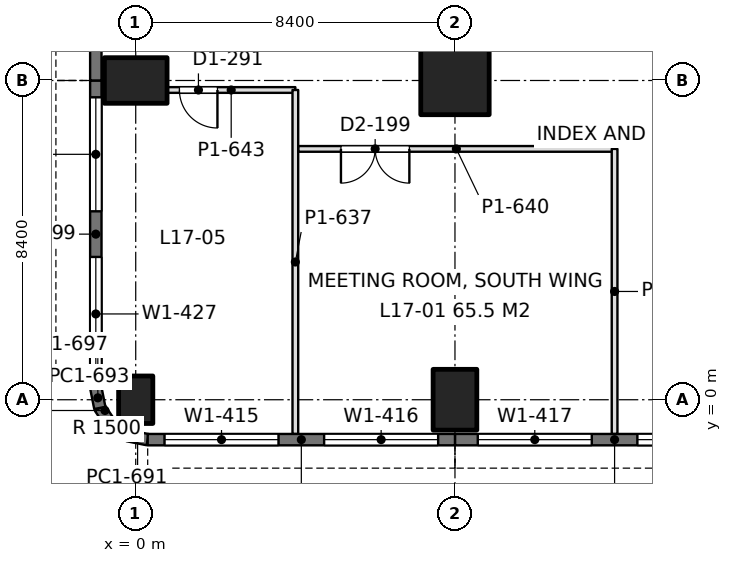
"""IFC4 building model, lengths in metres.
Left out: names, types, materials, properties, quantities, classifications, styles, units other than length and angle.
Written with IfcOpenShell. Run it as: python <this file> out.ifc"""

import sys

from ifc_helpers import new_model, si_unit, direction, frame, frame_2d, origin, origin_with_axes, origin_2d, place, context, subcontext, project, spatial, rectangle, extrude, element, fill, save


model = new_model("IFC4")
c1 = context("Model", 3, precision=1e-05, world=origin(), true_north=direction((0.0, 1.0)))
c2 = subcontext(c1, "Body", "Model", "MODEL_VIEW")
j1 = project(units=[si_unit("LENGTHUNIT", "METRE"), si_unit("PLANEANGLEUNIT", "RADIAN")], contexts=[c1])
p1 = place(None, origin())
s1 = spatial("IfcSite", under=j1, at=p1, CompositionType="ELEMENT")
p2 = place(p1, origin())
s2 = spatial("IfcBuilding", under=s1, at=p2, CompositionType="ELEMENT")
p3 = place(p2, frame((0.0, 0.0, 77.4)))
s3 = spatial("IfcBuildingStorey", under=s2, at=p3, CompositionType="ELEMENT", Elevation=77.4)
p4 = place(p3, origin_with_axes())
e1 = element("IfcColumn", 1, at=p4, inside=s3, PredefinedType="COLUMN", context=c2, shape_type="SweptSolid", body=[
    extrude(rectangle(XDim=0.9, YDim=1.25, at=origin_2d()), origin(), (0.0, 0.0, 1.0), 4.5),
])
p5 = place(p3, frame((0.0, 8.4, 0.0), z_axis=(0.0, 0.0, 1.0), x_axis=(0.0, 1.0, 0.0)))
e2 = element("IfcColumn", 2, at=p5, inside=s3, PredefinedType="COLUMN", context=c2, shape_type="SweptSolid", body=[
    extrude(rectangle(XDim=1.2, YDim=1.65, at=origin_2d()), origin(), (0.0, 0.0, 1.0), 4.5),
])
p6 = place(p3, frame((8.4, 0.0, 0.0), z_axis=(0.0, 0.0, 1.0), x_axis=(1.0, 0.0, 0.0)))
e3 = element("IfcColumn", 3, at=p6, inside=s3, PredefinedType="COLUMN", context=c2, shape_type="SweptSolid", body=[
    extrude(rectangle(XDim=1.15, YDim=1.6, at=origin_2d()), origin(), (0.0, 0.0, 1.0), 4.5),
])
p7 = place(p3, frame((8.4, 8.4, 0.0), z_axis=(0.0, 0.0, 1.0), x_axis=(1.0, 0.0, 0.0)))
e4 = element("IfcColumn", 4, at=p7, inside=s3, PredefinedType="COLUMN", context=c2, shape_type="SweptSolid", body=[
    extrude(rectangle(XDim=1.8, YDim=1.8, at=origin_2d()), origin(), (0.0, 0.0, 1.0), 4.5),
])
p8 = place(p3, frame((16.8, -1.05, 0.0), z_axis=(0.0, 0.0, 1.0), x_axis=(-1.0, 0.0, 0.0)))
e5 = element("IfcWall", 5, at=p8, inside=s3, PredefinedType="SOLIDWALL", context=c2, shape_type="SweptSolid", body=[
    extrude(rectangle(XDim=8.4, YDim=0.3, at=frame_2d((4.2, 0.0))), origin(), (0.0, 0.0, 1.0), 4.34),
])
p9 = place(p8, frame((0.6, 0.0, 0.9)))
e6 = element("IfcOpeningElement", 6, at=p9, cuts=e5, PredefinedType="OPENING", context=c2, shape_type="SweptSolid", body=[
    extrude(rectangle(XDim=3.0, YDim=1.9, at=frame_2d((1.5, 0.95))), frame((0.0, 0.16, 0.0), z_axis=(0.0, -1.0, 0.0), x_axis=(1.0, 0.0, 0.0)), (0.0, 0.0, 1.0), 0.32),
])
p10 = place(p8, frame((4.8, 0.0, 0.9)))
e7 = element("IfcOpeningElement", 7, at=p10, cuts=e5, PredefinedType="OPENING", context=c2, shape_type="SweptSolid", body=[
    extrude(rectangle(XDim=3.0, YDim=1.9, at=frame_2d((1.5, 0.95))), frame((0.0, 0.16, 0.0), z_axis=(0.0, -1.0, 0.0), x_axis=(1.0, 0.0, 0.0)), (0.0, 0.0, 1.0), 0.32),
])
p11 = place(p3, frame((8.4, -1.05, 0.0), z_axis=(0.0, 0.0, 1.0), x_axis=(-1.0, 0.0, 0.0)))
e8 = element("IfcWall", 8, at=p11, inside=s3, PredefinedType="SOLIDWALL", context=c2, shape_type="SweptSolid", body=[
    extrude(rectangle(XDim=8.085, YDim=0.3, at=frame_2d((4.042, 0.0))), origin(), (0.0, 0.0, 1.0), 4.34),
])
p12 = place(p11, frame((0.443, 0.0, 0.9)))
e9 = element("IfcOpeningElement", 9, at=p12, cuts=e8, PredefinedType="OPENING", context=c2, shape_type="SweptSolid", body=[
    extrude(rectangle(XDim=3.0, YDim=1.9, at=frame_2d((1.5, 0.95))), frame((0.0, 0.16, 0.0), z_axis=(0.0, -1.0, 0.0), x_axis=(1.0, 0.0, 0.0)), (0.0, 0.0, 1.0), 0.32),
])
p13 = place(p11, frame((4.643, 0.0, 0.9)))
e10 = element("IfcOpeningElement", 10, at=p13, cuts=e8, PredefinedType="OPENING", context=c2, shape_type="SweptSolid", body=[
    extrude(rectangle(XDim=3.0, YDim=1.9, at=frame_2d((1.5, 0.95))), frame((0.0, 0.16, 0.0), z_axis=(0.0, -1.0, 0.0), x_axis=(1.0, 0.0, 0.0)), (0.0, 0.0, 1.0), 0.32),
])
p14 = place(p3, frame((0.315, -1.05, 0.0), z_axis=(0.0, 0.0, 1.0), x_axis=(-0.980788534345, 0.195073962632, 0.0)))
e11 = element("IfcWall", 11, at=p14, inside=s3, PredefinedType="SOLIDWALL", context=c2, shape_type="SweptSolid", body=[
    extrude(rectangle(XDim=0.541, YDim=0.3, at=frame_2d((0.271, 0.0))), origin(), (0.0, 0.0, 1.0), 4.34),
])
for number, where, z_axis, x_axis in (
    (12, (-0.216, -0.945, 0.0), (0.0, 0.0, 1.0), (-0.831, 0.556, 0.0)),
    (13, (-0.653, -0.653, 0.0), (0.0, 0.0, 1.0), (-0.556, 0.831, 0.0)),
):
    element("IfcWall", number, at=place(p3, frame(where, z_axis=z_axis, x_axis=x_axis)), inside=s3, PredefinedType="SOLIDWALL", context=c2, shape_type="SweptSolid", body=[
        extrude(rectangle(XDim=0.526, YDim=0.3, at=frame_2d((0.263, 0.0))), origin(), (0.0, 0.0, 1.0), 4.34),
    ])
p15 = place(p3, frame((-0.945, -0.216, 0.0), z_axis=(0.0, 0.0, 1.0), x_axis=(-0.195073962632, 0.980788534345, 0.0)))
e14 = element("IfcWall", 14, at=p15, inside=s3, PredefinedType="SOLIDWALL", context=c2, shape_type="SweptSolid", body=[
    extrude(rectangle(XDim=0.541, YDim=0.3, at=frame_2d((0.271, 0.0))), origin(), (0.0, 0.0, 1.0), 4.34),
])
p16 = place(p3, frame((-1.05, 0.315, 0.0), z_axis=(0.0, 0.0, 1.0), x_axis=(0.0, 1.0, 0.0)))
e15 = element("IfcWall", 15, at=p16, inside=s3, PredefinedType="SOLIDWALL", context=c2, shape_type="SweptSolid", body=[
    extrude(rectangle(XDim=8.085, YDim=0.3, at=frame_2d((4.042, 0.0))), origin(), (0.0, 0.0, 1.0), 4.34),
])
p17 = place(p16, frame((0.443, 0.0, 0.9)))
e16 = element("IfcOpeningElement", 16, at=p17, cuts=e15, PredefinedType="OPENING", context=c2, shape_type="SweptSolid", body=[
    extrude(rectangle(XDim=3.0, YDim=1.9, at=frame_2d((1.5, 0.95))), frame((0.0, 0.16, 0.0), z_axis=(0.0, -1.0, 0.0), x_axis=(1.0, 0.0, 0.0)), (0.0, 0.0, 1.0), 0.32),
])
p18 = place(p16, frame((4.643, 0.0, 0.9)))
e17 = element("IfcOpeningElement", 17, at=p18, cuts=e15, PredefinedType="OPENING", context=c2, shape_type="SweptSolid", body=[
    extrude(rectangle(XDim=3.0, YDim=1.9, at=frame_2d((1.5, 0.95))), frame((0.0, 0.16, 0.0), z_axis=(0.0, -1.0, 0.0), x_axis=(1.0, 0.0, 0.0)), (0.0, 0.0, 1.0), 0.32),
])
p19 = place(p3, frame((-1.05, 8.4, 0.0), z_axis=(0.0, 0.0, 1.0), x_axis=(0.0, 1.0, 0.0)))
e18 = element("IfcWall", 18, at=p19, inside=s3, PredefinedType="SOLIDWALL", context=c2, shape_type="SweptSolid", body=[
    extrude(rectangle(XDim=4.2, YDim=0.3, at=frame_2d((2.1, 0.0))), origin(), (0.0, 0.0, 1.0), 4.34),
])
p20 = place(p19, frame((0.9, 0.0, 0.9)))
e19 = element("IfcOpeningElement", 19, at=p20, cuts=e18, PredefinedType="OPENING", context=c2, shape_type="SweptSolid", body=[
    extrude(rectangle(XDim=2.4, YDim=1.9, at=frame_2d((1.2, 0.95))), frame((0.0, 0.16, 0.0), z_axis=(0.0, -1.0, 0.0), x_axis=(1.0, 0.0, 0.0)), (0.0, 0.0, 1.0), 0.32),
])
p21 = place(p3, frame((0.824, 8.15, 0.0), z_axis=(0.0, 0.0, 1.0), x_axis=(1.0, 0.0, 0.0)))
e20 = element("IfcWall", 20, at=p21, inside=s3, PredefinedType="PARTITIONING", context=c2, shape_type="SweptSolid", body=[
    extrude(rectangle(XDim=3.376, YDim=0.15, at=frame_2d((1.688, 0.0))), origin(), (0.0, 0.0, 1.0), 3.84),
])
p22 = place(p21, frame((0.326, 0.0, 0.0)))
e21 = element("IfcOpeningElement", 21, at=p22, cuts=e20, PredefinedType="OPENING", context=c2, shape_type="SweptSolid", body=[
    extrude(rectangle(XDim=1.0, YDim=2.2, at=frame_2d((0.5, 1.1))), frame((0.0, 0.085, 0.0), z_axis=(0.0, -1.0, 0.0), x_axis=(1.0, 0.0, 0.0)), (0.0, 0.0, 1.0), 0.17),
])
p23 = place(p3, frame((4.274, 6.6, 0.0), z_axis=(0.0, 0.0, 1.0), x_axis=(1.0, 0.0, 0.0)))
e22 = element("IfcWall", 22, at=p23, inside=s3, PredefinedType="PARTITIONING", context=c2, shape_type="SweptSolid", body=[
    extrude(rectangle(XDim=8.326, YDim=0.15, at=frame_2d((4.163, 0.0))), origin(), (0.0, 0.0, 1.0), 3.74),
])
p24 = place(p23, frame((1.126, 0.0, 0.0)))
e23 = element("IfcOpeningElement", 23, at=p24, cuts=e22, PredefinedType="OPENING", context=c2, shape_type="SweptSolid", body=[
    extrude(rectangle(XDim=1.8, YDim=2.2, at=frame_2d((0.9, 1.1))), frame((0.0, 0.085, 0.0), z_axis=(0.0, -1.0, 0.0), x_axis=(1.0, 0.0, 0.0)), (0.0, 0.0, 1.0), 0.17),
])
p25 = place(p3, frame((4.2, -0.902, 0.0), z_axis=(0.0, 0.0, 1.0), x_axis=(0.0, 1.0, 0.0)))
e24 = element("IfcWall", 24, at=p25, inside=s3, PredefinedType="PARTITIONING", context=c2, shape_type="SweptSolid", body=[
    extrude(rectangle(XDim=9.052, YDim=0.15, at=frame_2d((4.526, 0.0))), origin(), (0.0, 0.0, 1.0), 3.84),
])
p26 = place(p3, frame((12.6, -0.902, 0.0), z_axis=(0.0, 0.0, 1.0), x_axis=(0.0, 1.0, 0.0)))
e25 = element("IfcWall", 25, at=p26, inside=s3, PredefinedType="PARTITIONING", context=c2, shape_type="SweptSolid", body=[
    extrude(rectangle(XDim=7.502, YDim=0.15, at=frame_2d((3.751, 0.0))), origin(), (0.0, 0.0, 1.0), 3.84),
])
p27 = place(p9, origin())
e26 = element("IfcWindow", 26, at=p27, inside=s3, PartitioningType="SINGLE_PANEL", PredefinedType="WINDOW", context=c2, shape_type="SweptSolid", body=[
    extrude(rectangle(XDim=3.0, YDim=1.9, at=frame_2d((1.5, 0.95))), frame((0.0, 0.03, 0.0), z_axis=(0.0, -1.0, 0.0), x_axis=(1.0, 0.0, 0.0)), (0.0, 0.0, 1.0), 0.06),
])
fill(e6, e26)
p28 = place(p10, origin())
e27 = element("IfcWindow", 27, at=p28, inside=s3, PartitioningType="SINGLE_PANEL", PredefinedType="WINDOW", context=c2, shape_type="SweptSolid", body=[
    extrude(rectangle(XDim=3.0, YDim=1.9, at=frame_2d((1.5, 0.95))), frame((0.0, 0.03, 0.0), z_axis=(0.0, -1.0, 0.0), x_axis=(1.0, 0.0, 0.0)), (0.0, 0.0, 1.0), 0.06),
])
fill(e7, e27)
p29 = place(p12, origin())
e28 = element("IfcWindow", 28, at=p29, inside=s3, PartitioningType="SINGLE_PANEL", PredefinedType="WINDOW", context=c2, shape_type="SweptSolid", body=[
    extrude(rectangle(XDim=3.0, YDim=1.9, at=frame_2d((1.5, 0.95))), frame((0.0, 0.03, 0.0), z_axis=(0.0, -1.0, 0.0), x_axis=(1.0, 0.0, 0.0)), (0.0, 0.0, 1.0), 0.06),
])
fill(e9, e28)
p30 = place(p13, origin())
e29 = element("IfcWindow", 29, at=p30, inside=s3, PartitioningType="SINGLE_PANEL", PredefinedType="WINDOW", context=c2, shape_type="SweptSolid", body=[
    extrude(rectangle(XDim=3.0, YDim=1.9, at=frame_2d((1.5, 0.95))), frame((0.0, 0.03, 0.0), z_axis=(0.0, -1.0, 0.0), x_axis=(1.0, 0.0, 0.0)), (0.0, 0.0, 1.0), 0.06),
])
fill(e10, e29)
p31 = place(p17, origin())
e30 = element("IfcWindow", 30, at=p31, inside=s3, PartitioningType="SINGLE_PANEL", PredefinedType="WINDOW", context=c2, shape_type="SweptSolid", body=[
    extrude(rectangle(XDim=3.0, YDim=1.9, at=frame_2d((1.5, 0.95))), frame((0.0, 0.03, 0.0), z_axis=(0.0, -1.0, 0.0), x_axis=(1.0, 0.0, 0.0)), (0.0, 0.0, 1.0), 0.06),
])
fill(e16, e30)
p32 = place(p18, origin())
e31 = element("IfcWindow", 31, at=p32, inside=s3, PartitioningType="SINGLE_PANEL", PredefinedType="WINDOW", context=c2, shape_type="SweptSolid", body=[
    extrude(rectangle(XDim=3.0, YDim=1.9, at=frame_2d((1.5, 0.95))), frame((0.0, 0.03, 0.0), z_axis=(0.0, -1.0, 0.0), x_axis=(1.0, 0.0, 0.0)), (0.0, 0.0, 1.0), 0.06),
])
fill(e17, e31)
p33 = place(p22, frame((1.0, 0.0, 0.0), z_axis=(0.0, 0.0, 1.0), x_axis=(-1.0, 0.0, 0.0)))
e32 = element("IfcDoor", 32, at=p33, inside=s3, OperationType="SINGLE_SWING_LEFT", PredefinedType="DOOR", context=c2, shape_type="SweptSolid", body=[
    extrude(rectangle(XDim=1.0, YDim=2.2, at=frame_2d((0.5, 1.1))), frame((0.0, 0.025, 0.0), z_axis=(0.0, -1.0, 0.0), x_axis=(1.0, 0.0, 0.0)), (0.0, 0.0, 1.0), 0.05),
])
fill(e21, e32)
p34 = place(p24, frame((1.8, 0.0, 0.0), z_axis=(0.0, 0.0, 1.0), x_axis=(-1.0, 0.0, 0.0)))
e33 = element("IfcDoor", 33, at=p34, inside=s3, OperationType="DOUBLE_DOOR_SINGLE_SWING", PredefinedType="DOOR", context=c2, shape_type="SweptSolid", body=[
    extrude(rectangle(XDim=1.8, YDim=2.2, at=frame_2d((0.9, 1.1))), frame((0.0, 0.025, 0.0), z_axis=(0.0, -1.0, 0.0), x_axis=(1.0, 0.0, 0.0)), (0.0, 0.0, 1.0), 0.05),
])
fill(e23, e33)
save(model, sys.argv[1])
